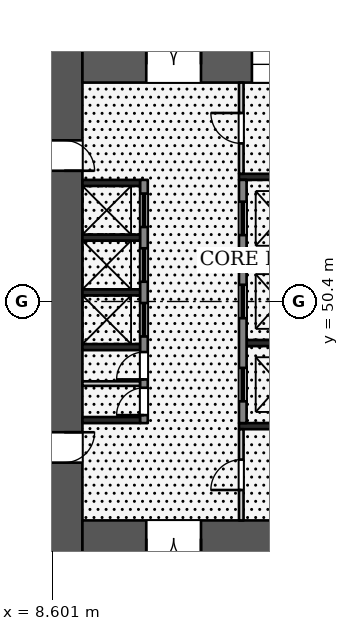
"""IFC4 building model, lengths in metres.
Left out: names, types, materials, properties, quantities, classifications, styles, units other than length and angle.
Written with IfcOpenShell. Run it as: python <this file> out.ifc"""

import sys

from ifc_helpers import new_model, si_unit, direction, frame, frame_2d, origin, place, context, subcontext, project, spatial, rectangle, extrude, element, fill, save


model = new_model("IFC4")
c1 = context("Model", 3, precision=1e-05, world=origin(), true_north=direction((0.0, 1.0)))
c2 = subcontext(c1, "Body", "Model", "MODEL_VIEW")
j1 = project(units=[si_unit("LENGTHUNIT", "METRE"), si_unit("PLANEANGLEUNIT", "RADIAN")], contexts=[c1])
p1 = place(None, origin())
s1 = spatial("IfcSite", under=j1, at=p1, CompositionType="ELEMENT")
p2 = place(p1, origin())
s2 = spatial("IfcBuilding", under=s1, at=p2, CompositionType="ELEMENT")
p3 = place(p2, origin())
s3 = spatial("IfcBuildingStorey", under=s2, at=p3, CompositionType="ELEMENT", Elevation=0.0)
p4 = place(p3, frame((9.0, 58.8, 0.0), z_axis=(0.0, 0.0, 1.0), x_axis=(0.0, -1.0, 0.0)))
e1 = element("IfcWall", 1, at=p4, inside=s3, PredefinedType="SHEAR", context=c2, shape_type="SweptSolid", body=[
    extrude(rectangle(XDim=16.8, YDim=1.2, at=frame_2d((8.4, 0.0))), origin(), (0.0, 0.0, 1.0), 8.7),
])
p5 = place(p4, frame((3.1, 0.0, 0.0)))
e2 = element("IfcOpeningElement", 2, at=p5, cuts=e1, PredefinedType="OPENING", context=c2, shape_type="SweptSolid", body=[
    extrude(rectangle(XDim=1.0, YDim=2.1, at=frame_2d((0.5, 1.05))), frame((0.0, 0.61, 0.0), z_axis=(0.0, -1.0, 0.0), x_axis=(1.0, 0.0, 0.0)), (0.0, 0.0, 1.0), 1.22),
])
p6 = place(p4, frame((12.7, 0.0, 0.0)))
e3 = element("IfcOpeningElement", 3, at=p6, cuts=e1, PredefinedType="OPENING", context=c2, shape_type="SweptSolid", body=[
    extrude(rectangle(XDim=1.0, YDim=2.1, at=frame_2d((0.5, 1.05))), frame((0.0, 0.61, 0.0), z_axis=(0.0, -1.0, 0.0), x_axis=(1.0, 0.0, 0.0)), (0.0, 0.0, 1.0), 1.22),
])
p7 = place(p3, frame((9.6, 58.2, 0.0), z_axis=(0.0, 0.0, 1.0), x_axis=(1.0, 0.0, 0.0)))
e4 = element("IfcWall", 4, at=p7, inside=s3, PredefinedType="SHEAR", context=c2, shape_type="SweptSolid", body=[
    extrude(rectangle(XDim=14.4, YDim=1.2, at=frame_2d((7.2, 0.0))), origin(), (0.0, 0.0, 1.0), 8.7),
])
p8 = place(p7, frame((2.1, 0.0, 0.0)))
e5 = element("IfcOpeningElement", 5, at=p8, cuts=e4, PredefinedType="OPENING", context=c2, shape_type="SweptSolid", body=[
    extrude(rectangle(XDim=1.8, YDim=2.1, at=frame_2d((0.9, 1.05))), frame((0.0, 0.61, 0.0), z_axis=(0.0, -1.0, 0.0), x_axis=(1.0, 0.0, 0.0)), (0.0, 0.0, 1.0), 1.22),
])
p9 = place(p7, frame((9.1, 0.0, 0.0)))
e6 = element("IfcOpeningElement", 6, at=p9, cuts=e4, PredefinedType="OPENING", context=c2, shape_type="SweptSolid", body=[
    extrude(rectangle(XDim=1.0, YDim=2.1, at=frame_2d((0.5, 1.05))), frame((0.0, 0.61, 0.0), z_axis=(0.0, -1.0, 0.0), x_axis=(1.0, 0.0, 0.0)), (0.0, 0.0, 1.0), 1.22),
])
p10 = place(p7, frame((5.575, 0.0, 0.6)))
e7 = element("IfcOpeningElement", 7, at=p10, cuts=e4, PredefinedType="OPENING", context=c2, shape_type="SweptSolid", body=[
    extrude(rectangle(XDim=3.0, YDim=2.1, at=frame_2d((1.5, 1.05))), frame((0.0, 0.61, 0.0), z_axis=(0.0, -1.0, 0.0), x_axis=(1.0, 0.0, 0.0)), (0.0, 0.0, 1.0), 1.22),
])
p11 = place(p7, frame((12.197, 0.0, 0.5)))
e8 = element("IfcOpeningElement", 8, at=p11, cuts=e4, PredefinedType="OPENING", context=c2, shape_type="SweptSolid", body=[
    extrude(rectangle(XDim=1.2, YDim=2.4, at=frame_2d((0.6, 1.2))), frame((0.0, 0.61, 0.0), z_axis=(0.0, -1.0, 0.0), x_axis=(1.0, 0.0, 0.0)), (0.0, 0.0, 1.0), 1.22),
])
p12 = place(p3, frame((9.6, 42.6, 0.0), z_axis=(0.0, 0.0, 1.0), x_axis=(1.0, 0.0, 0.0)))
e9 = element("IfcWall", 9, at=p12, inside=s3, PredefinedType="SHEAR", context=c2, shape_type="SweptSolid", body=[
    extrude(rectangle(XDim=14.4, YDim=1.2, at=frame_2d((7.2, 0.0))), origin(), (0.0, 0.0, 1.0), 8.7),
])
p13 = place(p12, frame((2.1, 0.0, 0.0)))
e10 = element("IfcOpeningElement", 10, at=p13, cuts=e9, PredefinedType="OPENING", context=c2, shape_type="SweptSolid", body=[
    extrude(rectangle(XDim=1.8, YDim=2.1, at=frame_2d((0.9, 1.05))), frame((0.0, 0.61, 0.0), z_axis=(0.0, -1.0, 0.0), x_axis=(1.0, 0.0, 0.0)), (0.0, 0.0, 1.0), 1.22),
])
for number, where, z_axis, x_axis in (
    (11, (9.6, 54.3, 0.0), (0.0, 0.0, 1.0), (1.0, 0.0, 0.0)),
    (12, (9.6, 52.5, 0.0), (0.0, 0.0, 1.0), (1.0, 0.0, 0.0)),
    (13, (9.6, 50.7, 0.0), (0.0, 0.0, 1.0), (1.0, 0.0, 0.0)),
    (14, (9.6, 48.9, 0.0), (0.0, 0.0, 1.0), (1.0, 0.0, 0.0)),
    (15, (9.6, 46.5, 0.0), (0.0, 0.0, 1.0), (1.0, 0.0, 0.0)),
):
    element("IfcWall", number, at=place(p3, frame(where, z_axis=z_axis, x_axis=x_axis)), inside=s3, PredefinedType="SHEAR", context=c2, shape_type="SweptSolid", body=[
        extrude(rectangle(XDim=1.9, YDim=0.2, at=frame_2d((0.95, 0.0))), origin(), (0.0, 0.0, 1.0), 8.7),
    ])
p14 = place(p3, frame((9.6, 47.7, 0.0), z_axis=(0.0, 0.0, 1.0), x_axis=(1.0, 0.0, 0.0)))
e16 = element("IfcWall", 16, at=p14, inside=s3, PredefinedType="PARTITIONING", context=c2, shape_type="SweptSolid", body=[
    extrude(rectangle(XDim=1.9, YDim=0.15, at=frame_2d((0.95, 0.0))), origin(), (0.0, 0.0, 1.0), 8.7),
])
p15 = place(p3, frame((11.625, 54.4, 0.0), z_axis=(0.0, 0.0, 1.0), x_axis=(0.0, -1.0, 0.0)))
e17 = element("IfcWall", 17, at=p15, inside=s3, PredefinedType="SHEAR", context=c2, shape_type="SweptSolid", body=[
    extrude(rectangle(XDim=8.0, YDim=0.25, at=frame_2d((4.0, 0.0))), origin(), (0.0, 0.0, 1.0), 8.7),
])
p16 = place(p15, frame((0.45, 0.0, 0.0)))
e18 = element("IfcOpeningElement", 18, at=p16, cuts=e17, PredefinedType="OPENING", context=c2, shape_type="SweptSolid", body=[
    extrude(rectangle(XDim=1.1, YDim=2.1, at=frame_2d((0.55, 1.05))), frame((0.0, 0.135, 0.0), z_axis=(0.0, -1.0, 0.0), x_axis=(1.0, 0.0, 0.0)), (0.0, 0.0, 1.0), 0.27),
])
p17 = place(p15, frame((2.25, 0.0, 0.0)))
e19 = element("IfcOpeningElement", 19, at=p17, cuts=e17, PredefinedType="OPENING", context=c2, shape_type="SweptSolid", body=[
    extrude(rectangle(XDim=1.1, YDim=2.1, at=frame_2d((0.55, 1.05))), frame((0.0, 0.135, 0.0), z_axis=(0.0, -1.0, 0.0), x_axis=(1.0, 0.0, 0.0)), (0.0, 0.0, 1.0), 0.27),
])
p18 = place(p15, frame((4.05, 0.0, 0.0)))
e20 = element("IfcOpeningElement", 20, at=p18, cuts=e17, PredefinedType="OPENING", context=c2, shape_type="SweptSolid", body=[
    extrude(rectangle(XDim=1.1, YDim=2.1, at=frame_2d((0.55, 1.05))), frame((0.0, 0.135, 0.0), z_axis=(0.0, -1.0, 0.0), x_axis=(1.0, 0.0, 0.0)), (0.0, 0.0, 1.0), 0.27),
])
p19 = place(p15, frame((5.663, 0.0, 0.0)))
e21 = element("IfcOpeningElement", 21, at=p19, cuts=e17, PredefinedType="OPENING", context=c2, shape_type="SweptSolid", body=[
    extrude(rectangle(XDim=0.9, YDim=2.1, at=frame_2d((0.45, 1.05))), frame((0.0, 0.135, 0.0), z_axis=(0.0, -1.0, 0.0), x_axis=(1.0, 0.0, 0.0)), (0.0, 0.0, 1.0), 0.27),
])
p20 = place(p15, frame((6.837, 0.0, 0.0)))
e22 = element("IfcOpeningElement", 22, at=p20, cuts=e17, PredefinedType="OPENING", context=c2, shape_type="SweptSolid", body=[
    extrude(rectangle(XDim=0.9, YDim=2.1, at=frame_2d((0.45, 1.05))), frame((0.0, 0.135, 0.0), z_axis=(0.0, -1.0, 0.0), x_axis=(1.0, 0.0, 0.0)), (0.0, 0.0, 1.0), 0.27),
])
for number, where, z_axis, x_axis in (
    (23, (15.0, 51.767, 0.0), (0.0, 0.0, 1.0), (1.0, 0.0, 0.0)),
    (24, (15.0, 49.033, 0.0), (0.0, 0.0, 1.0), (1.0, 0.0, 0.0)),
):
    element("IfcWall", number, at=place(p3, frame(where, z_axis=z_axis, x_axis=x_axis)), inside=s3, PredefinedType="SHEAR", context=c2, shape_type="SweptSolid", body=[
        extrude(rectangle(XDim=1.9, YDim=0.2, at=frame_2d((0.95, 0.0))), origin(), (0.0, 0.0, 1.0), 8.7),
    ])
p21 = place(p3, frame((14.875, 54.4, 0.0), z_axis=(0.0, 0.0, 1.0), x_axis=(0.0, -1.0, 0.0)))
e25 = element("IfcWall", 25, at=p21, inside=s3, PredefinedType="SHEAR", context=c2, shape_type="SweptSolid", body=[
    extrude(rectangle(XDim=8.0, YDim=0.25, at=frame_2d((4.0, 0.0))), origin(), (0.0, 0.0, 1.0), 8.7),
])
p22 = place(p21, frame((0.717, 0.0, 0.0)))
e26 = element("IfcOpeningElement", 26, at=p22, cuts=e25, PredefinedType="OPENING", context=c2, shape_type="SweptSolid", body=[
    extrude(rectangle(XDim=1.1, YDim=2.1, at=frame_2d((0.55, 1.05))), frame((0.0, 0.135, 0.0), z_axis=(0.0, -1.0, 0.0), x_axis=(1.0, 0.0, 0.0)), (0.0, 0.0, 1.0), 0.27),
])
p23 = place(p21, frame((3.45, 0.0, 0.0)))
e27 = element("IfcOpeningElement", 27, at=p23, cuts=e25, PredefinedType="OPENING", context=c2, shape_type="SweptSolid", body=[
    extrude(rectangle(XDim=1.1, YDim=2.1, at=frame_2d((0.55, 1.05))), frame((0.0, 0.135, 0.0), z_axis=(0.0, -1.0, 0.0), x_axis=(1.0, 0.0, 0.0)), (0.0, 0.0, 1.0), 0.27),
])
p24 = place(p21, frame((6.183, 0.0, 0.0)))
e28 = element("IfcOpeningElement", 28, at=p24, cuts=e25, PredefinedType="OPENING", context=c2, shape_type="SweptSolid", body=[
    extrude(rectangle(XDim=1.1, YDim=2.1, at=frame_2d((0.55, 1.05))), frame((0.0, 0.135, 0.0), z_axis=(0.0, -1.0, 0.0), x_axis=(1.0, 0.0, 0.0)), (0.0, 0.0, 1.0), 0.27),
])
p25 = place(p3, frame((14.75, 54.5, 0.0), z_axis=(0.0, 0.0, 1.0), x_axis=(1.0, 0.0, 0.0)))
e29 = element("IfcWall", 29, at=p25, inside=s3, PredefinedType="SHEAR", context=c2, shape_type="SweptSolid", body=[
    extrude(rectangle(XDim=2.4, YDim=0.2, at=frame_2d((1.2, 0.0))), origin(), (0.0, 0.0, 1.0), 8.7),
])
p26 = place(p3, frame((14.825, 57.6, 0.0), z_axis=(0.0, 0.0, 1.0), x_axis=(0.0, -1.0, 0.0)))
e30 = element("IfcWall", 30, at=p26, inside=s3, PredefinedType="PARTITIONING", context=c2, shape_type="SweptSolid", body=[
    extrude(rectangle(XDim=3.0, YDim=0.15, at=frame_2d((1.5, 0.0))), origin(), (0.0, 0.0, 1.0), 8.7),
])
p27 = place(p26, frame((1.0, 0.0, 0.0)))
e31 = element("IfcOpeningElement", 31, at=p27, cuts=e30, PredefinedType="OPENING", context=c2, shape_type="SweptSolid", body=[
    extrude(rectangle(XDim=1.0, YDim=2.1, at=frame_2d((0.5, 1.05))), frame((0.0, 0.085, 0.0), z_axis=(0.0, -1.0, 0.0), x_axis=(1.0, 0.0, 0.0)), (0.0, 0.0, 1.0), 0.17),
])
p28 = place(p3, frame((14.75, 46.3, 0.0), z_axis=(0.0, 0.0, 1.0), x_axis=(1.0, 0.0, 0.0)))
e32 = element("IfcWall", 32, at=p28, inside=s3, PredefinedType="SHEAR", context=c2, shape_type="SweptSolid", body=[
    extrude(rectangle(XDim=9.25, YDim=0.2, at=frame_2d((4.625, 0.0))), origin(), (0.0, 0.0, 1.0), 8.7),
])
p29 = place(p3, frame((14.825, 46.2, 0.0), z_axis=(0.0, 0.0, 1.0), x_axis=(0.0, -1.0, 0.0)))
e33 = element("IfcWall", 33, at=p29, inside=s3, PredefinedType="PARTITIONING", context=c2, shape_type="SweptSolid", body=[
    extrude(rectangle(XDim=3.0, YDim=0.15, at=frame_2d((1.5, 0.0))), origin(), (0.0, 0.0, 1.0), 8.7),
])
p30 = place(p29, frame((1.0, 0.0, 0.0)))
e34 = element("IfcOpeningElement", 34, at=p30, cuts=e33, PredefinedType="OPENING", context=c2, shape_type="SweptSolid", body=[
    extrude(rectangle(XDim=1.0, YDim=2.1, at=frame_2d((0.5, 1.05))), frame((0.0, 0.085, 0.0), z_axis=(0.0, -1.0, 0.0), x_axis=(1.0, 0.0, 0.0)), (0.0, 0.0, 1.0), 0.17),
])
p31 = place(p5, origin())
e35 = element("IfcDoor", 35, at=p31, inside=s3, OperationType="SINGLE_SWING_RIGHT", PredefinedType="DOOR", context=c2, shape_type="SweptSolid", body=[
    extrude(rectangle(XDim=1.0, YDim=2.1, at=frame_2d((0.5, 1.05))), frame((0.0, 0.025, 0.0), z_axis=(0.0, -1.0, 0.0), x_axis=(1.0, 0.0, 0.0)), (0.0, 0.0, 1.0), 0.05),
])
fill(e2, e35)
p32 = place(p6, origin())
e36 = element("IfcDoor", 36, at=p32, inside=s3, OperationType="SINGLE_SWING_LEFT", PredefinedType="DOOR", context=c2, shape_type="SweptSolid", body=[
    extrude(rectangle(XDim=1.0, YDim=2.1, at=frame_2d((0.5, 1.05))), frame((0.0, 0.025, 0.0), z_axis=(0.0, -1.0, 0.0), x_axis=(1.0, 0.0, 0.0)), (0.0, 0.0, 1.0), 0.05),
])
fill(e3, e36)
p33 = place(p8, origin())
e37 = element("IfcDoor", 37, at=p33, inside=s3, OperationType="DOUBLE_DOOR_SINGLE_SWING", PredefinedType="DOOR", context=c2, shape_type="SweptSolid", body=[
    extrude(rectangle(XDim=1.8, YDim=2.1, at=frame_2d((0.9, 1.05))), frame((0.0, 0.025, 0.0), z_axis=(0.0, -1.0, 0.0), x_axis=(1.0, 0.0, 0.0)), (0.0, 0.0, 1.0), 0.05),
])
fill(e5, e37)
p34 = place(p13, frame((1.8, 0.0, 0.0), z_axis=(0.0, 0.0, 1.0), x_axis=(-1.0, 0.0, 0.0)))
e38 = element("IfcDoor", 38, at=p34, inside=s3, OperationType="DOUBLE_DOOR_SINGLE_SWING", PredefinedType="DOOR", context=c2, shape_type="SweptSolid", body=[
    extrude(rectangle(XDim=1.8, YDim=2.1, at=frame_2d((0.9, 1.05))), frame((0.0, 0.025, 0.0), z_axis=(0.0, -1.0, 0.0), x_axis=(1.0, 0.0, 0.0)), (0.0, 0.0, 1.0), 0.05),
])
fill(e10, e38)
p35 = place(p16, origin())
e39 = element("IfcDoor", 39, at=p35, inside=s3, OperationType="DOUBLE_DOOR_SLIDING", PredefinedType="DOOR", context=c2, shape_type="SweptSolid", body=[
    extrude(rectangle(XDim=1.1, YDim=2.1, at=frame_2d((0.55, 1.05))), frame((0.0, 0.025, 0.0), z_axis=(0.0, -1.0, 0.0), x_axis=(1.0, 0.0, 0.0)), (0.0, 0.0, 1.0), 0.05),
])
fill(e18, e39)
p36 = place(p17, origin())
e40 = element("IfcDoor", 40, at=p36, inside=s3, OperationType="DOUBLE_DOOR_SLIDING", PredefinedType="DOOR", context=c2, shape_type="SweptSolid", body=[
    extrude(rectangle(XDim=1.1, YDim=2.1, at=frame_2d((0.55, 1.05))), frame((0.0, 0.025, 0.0), z_axis=(0.0, -1.0, 0.0), x_axis=(1.0, 0.0, 0.0)), (0.0, 0.0, 1.0), 0.05),
])
fill(e19, e40)
p37 = place(p18, origin())
e41 = element("IfcDoor", 41, at=p37, inside=s3, OperationType="DOUBLE_DOOR_SLIDING", PredefinedType="DOOR", context=c2, shape_type="SweptSolid", body=[
    extrude(rectangle(XDim=1.1, YDim=2.1, at=frame_2d((0.55, 1.05))), frame((0.0, 0.025, 0.0), z_axis=(0.0, -1.0, 0.0), x_axis=(1.0, 0.0, 0.0)), (0.0, 0.0, 1.0), 0.05),
])
fill(e20, e41)
p38 = place(p19, frame((0.9, 0.0, 0.0), z_axis=(0.0, 0.0, 1.0), x_axis=(-1.0, 0.0, 0.0)))
e42 = element("IfcDoor", 42, at=p38, inside=s3, OperationType="SINGLE_SWING_LEFT", PredefinedType="DOOR", context=c2, shape_type="SweptSolid", body=[
    extrude(rectangle(XDim=0.9, YDim=2.1, at=frame_2d((0.45, 1.05))), frame((0.0, 0.025, 0.0), z_axis=(0.0, -1.0, 0.0), x_axis=(1.0, 0.0, 0.0)), (0.0, 0.0, 1.0), 0.05),
])
fill(e21, e42)
p39 = place(p20, frame((0.9, 0.0, 0.0), z_axis=(0.0, 0.0, 1.0), x_axis=(-1.0, 0.0, 0.0)))
e43 = element("IfcDoor", 43, at=p39, inside=s3, OperationType="SINGLE_SWING_LEFT", PredefinedType="DOOR", context=c2, shape_type="SweptSolid", body=[
    extrude(rectangle(XDim=0.9, YDim=2.1, at=frame_2d((0.45, 1.05))), frame((0.0, 0.025, 0.0), z_axis=(0.0, -1.0, 0.0), x_axis=(1.0, 0.0, 0.0)), (0.0, 0.0, 1.0), 0.05),
])
fill(e22, e43)
p40 = place(p22, origin())
e44 = element("IfcDoor", 44, at=p40, inside=s3, OperationType="DOUBLE_DOOR_SLIDING", PredefinedType="DOOR", context=c2, shape_type="SweptSolid", body=[
    extrude(rectangle(XDim=1.1, YDim=2.1, at=frame_2d((0.55, 1.05))), frame((0.0, 0.025, 0.0), z_axis=(0.0, -1.0, 0.0), x_axis=(1.0, 0.0, 0.0)), (0.0, 0.0, 1.0), 0.05),
])
fill(e26, e44)
p41 = place(p23, origin())
e45 = element("IfcDoor", 45, at=p41, inside=s3, OperationType="DOUBLE_DOOR_SLIDING", PredefinedType="DOOR", context=c2, shape_type="SweptSolid", body=[
    extrude(rectangle(XDim=1.1, YDim=2.1, at=frame_2d((0.55, 1.05))), frame((0.0, 0.025, 0.0), z_axis=(0.0, -1.0, 0.0), x_axis=(1.0, 0.0, 0.0)), (0.0, 0.0, 1.0), 0.05),
])
fill(e27, e45)
p42 = place(p24, origin())
e46 = element("IfcDoor", 46, at=p42, inside=s3, OperationType="DOUBLE_DOOR_SLIDING", PredefinedType="DOOR", context=c2, shape_type="SweptSolid", body=[
    extrude(rectangle(XDim=1.1, YDim=2.1, at=frame_2d((0.55, 1.05))), frame((0.0, 0.025, 0.0), z_axis=(0.0, -1.0, 0.0), x_axis=(1.0, 0.0, 0.0)), (0.0, 0.0, 1.0), 0.05),
])
fill(e28, e46)
p43 = place(p27, frame((1.0, 0.0, 0.0), z_axis=(0.0, 0.0, 1.0), x_axis=(-1.0, 0.0, 0.0)))
e47 = element("IfcDoor", 47, at=p43, inside=s3, OperationType="SINGLE_SWING_RIGHT", PredefinedType="DOOR", context=c2, shape_type="SweptSolid", body=[
    extrude(rectangle(XDim=1.0, YDim=2.1, at=frame_2d((0.5, 1.05))), frame((0.0, 0.025, 0.0), z_axis=(0.0, -1.0, 0.0), x_axis=(1.0, 0.0, 0.0)), (0.0, 0.0, 1.0), 0.05),
])
fill(e31, e47)
p44 = place(p30, frame((1.0, 0.0, 0.0), z_axis=(0.0, 0.0, 1.0), x_axis=(-1.0, 0.0, 0.0)))
e48 = element("IfcDoor", 48, at=p44, inside=s3, OperationType="SINGLE_SWING_LEFT", PredefinedType="DOOR", context=c2, shape_type="SweptSolid", body=[
    extrude(rectangle(XDim=1.0, YDim=2.1, at=frame_2d((0.5, 1.05))), frame((0.0, 0.025, 0.0), z_axis=(0.0, -1.0, 0.0), x_axis=(1.0, 0.0, 0.0)), (0.0, 0.0, 1.0), 0.05),
])
fill(e34, e48)
p45 = place(p10, origin())
e49 = element("IfcWindow", 49, at=p45, inside=s3, PartitioningType="SINGLE_PANEL", PredefinedType="WINDOW", context=c2, shape_type="SweptSolid", body=[
    extrude(rectangle(XDim=3.0, YDim=2.1, at=frame_2d((1.5, 1.05))), frame((0.0, 0.03, 0.0), z_axis=(0.0, -1.0, 0.0), x_axis=(1.0, 0.0, 0.0)), (0.0, 0.0, 1.0), 0.06),
])
fill(e7, e49)
save(model, sys.argv[1])
